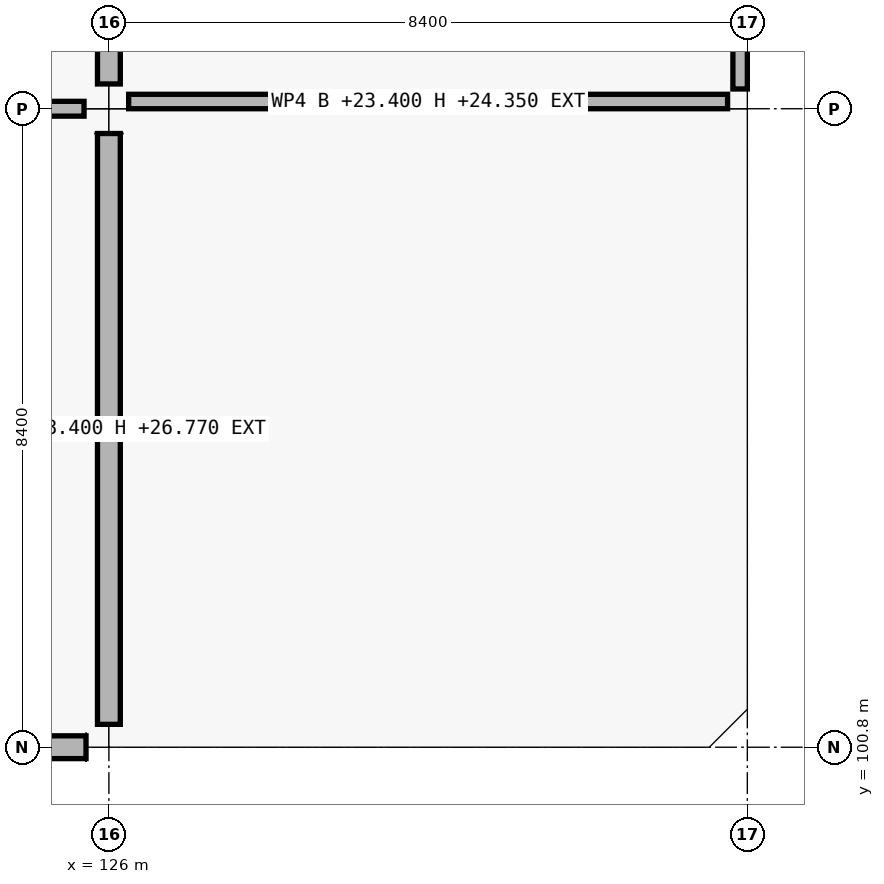
"""IFC4 building model, lengths in metres.
Left out: names, types, materials, properties, quantities, classifications, styles, units other than length and angle.
Written with IfcOpenShell. Run it as: python <this file> out.ifc"""

import sys

from ifc_helpers import new_model, si_unit, direction, frame, frame_2d, origin, origin_2d, place, context, subcontext, project, spatial, rectangle, extrude, element, fill, save


model = new_model("IFC4")
c1 = context("Model", 3, precision=1e-05, world=origin(), true_north=direction((0.0, 1.0)))
c2 = subcontext(c1, "Body", "Model", "MODEL_VIEW")
j1 = project(units=[si_unit("LENGTHUNIT", "METRE"), si_unit("PLANEANGLEUNIT", "RADIAN")], contexts=[c1])
p1 = place(None, origin())
s1 = spatial("IfcSite", under=j1, at=p1, CompositionType="ELEMENT")
p2 = place(p1, origin())
s2 = spatial("IfcBuilding", under=s1, at=p2, CompositionType="ELEMENT")
p3 = place(p2, frame((0.0, 0.0, 23.4)))
s3 = spatial("IfcBuildingStorey", under=s2, at=p3, CompositionType="ELEMENT", Elevation=23.4)
p4 = place(p3, frame((126.0, 100.8, 0.0), z_axis=(0.0, 0.0, 1.0), x_axis=(1.0, 0.0, 0.0)))
e1 = element("IfcColumn", 1, at=p4, inside=s3, PredefinedType="COLUMN", context=c2, shape_type="SweptSolid", body=[
    extrude(rectangle(XDim=0.6, YDim=0.6, at=origin_2d()), origin(), (0.0, 0.0, 1.0), 4.32),
])
p5 = place(p3, frame((126.0, 109.2, 0.0), z_axis=(0.0, 0.0, 1.0), x_axis=(1.0, 0.0, 0.0)))
e2 = element("IfcColumn", 2, at=p5, inside=s3, PredefinedType="COLUMN", context=c2, shape_type="SweptSolid", body=[
    extrude(rectangle(XDim=0.65, YDim=0.65, at=origin_2d()), origin(), (0.0, 0.0, 1.0), 4.32),
])
p6 = place(p3, frame((125.699, 100.8, 0.0), z_axis=(0.0, 0.0, 1.0), x_axis=(-1.0, 0.0, 0.0)))
e3 = element("IfcWall", 3, at=p6, inside=s3, PredefinedType="SOLIDWALL", context=c2, shape_type="SweptSolid", body=[
    extrude(rectangle(XDim=7.773, YDim=0.3, at=frame_2d((3.886, 0.0))), origin(), (0.0, 0.0, 1.0), 3.37),
])
p7 = place(p6, frame((2.986, 0.0, 0.9)))
e4 = element("IfcOpeningElement", 4, at=p7, cuts=e3, PredefinedType="OPENING", context=c2, shape_type="SweptSolid", body=[
    extrude(rectangle(XDim=1.8, YDim=1.8, at=frame_2d((0.9, 0.9))), frame((0.0, 0.15, 0.0), z_axis=(0.0, -1.0, 0.0), x_axis=(1.0, 0.0, 0.0)), (0.0, 0.0, 1.0), 0.3),
])
p8 = place(p3, frame((126.0, 108.874, 0.0), z_axis=(0.0, 0.0, 1.0), x_axis=(0.0, -1.0, 0.0)))
e5 = element("IfcWall", 5, at=p8, inside=s3, PredefinedType="SOLIDWALL", context=c2, shape_type="SweptSolid", body=[
    extrude(rectangle(XDim=7.773, YDim=0.3, at=frame_2d((3.886, 0.0))), origin(), (0.0, 0.0, 1.0), 3.37),
])
p9 = place(p8, frame((3.061, 0.0, 0.0)))
e6 = element("IfcOpeningElement", 6, at=p9, cuts=e5, PredefinedType="OPENING", context=c2, shape_type="SweptSolid", body=[
    extrude(rectangle(XDim=1.65, YDim=2.2, at=frame_2d((0.825, 1.1))), frame((0.0, 0.15, 0.0), z_axis=(0.0, -1.0, 0.0), x_axis=(1.0, 0.0, 0.0)), (0.0, 0.0, 1.0), 0.3),
])
p10 = place(p3, frame((126.0, 117.324, 0.0), z_axis=(0.0, 0.0, 1.0), x_axis=(0.0, -1.0, 0.0)))
e7 = element("IfcWall", 7, at=p10, inside=s3, PredefinedType="SOLIDWALL", context=c2, shape_type="SweptSolid", body=[
    extrude(rectangle(XDim=7.798, YDim=0.3, at=frame_2d((3.899, 0.0))), origin(), (0.0, 0.0, 1.0), 3.37),
])
p11 = place(p10, frame((2.699, 0.0, 0.9)))
e8 = element("IfcOpeningElement", 8, at=p11, cuts=e7, PredefinedType="OPENING", context=c2, shape_type="SweptSolid", body=[
    extrude(rectangle(XDim=2.4, YDim=1.8, at=frame_2d((1.2, 0.9))), frame((0.0, 0.15, 0.0), z_axis=(0.0, -1.0, 0.0), x_axis=(1.0, 0.0, 0.0)), (0.0, 0.0, 1.0), 0.3),
])
p12 = place(p3, frame((134.14, 109.295, 0.0), z_axis=(0.0, 0.0, 1.0), x_axis=(-1.0, 0.0, 0.0)))
e9 = element("IfcWall", 9, at=p12, inside=s3, PredefinedType="PARAPET", context=c2, shape_type="SweptSolid", body=[
    extrude(rectangle(XDim=7.88, YDim=0.19, at=frame_2d((3.94, 0.0))), origin(), (0.0, 0.0, 1.0), 0.95),
])
p13 = place(p3, frame((134.305, 117.34, 0.0), z_axis=(0.0, 0.0, 1.0), x_axis=(0.0, -1.0, 0.0)))
e10 = element("IfcWall", 10, at=p13, inside=s3, PredefinedType="PARAPET", context=c2, shape_type="SweptSolid", body=[
    extrude(rectangle(XDim=7.88, YDim=0.19, at=frame_2d((3.94, 0.0))), origin(), (0.0, 0.0, 1.0), 0.95),
])
p14 = place(p3, frame((117.902, 109.2, 0.0), z_axis=(0.0, 0.0, 1.0), x_axis=(1.0, 0.0, 0.0)))
e11 = element("IfcWall", 11, at=p14, inside=s3, PredefinedType="PARTITIONING", context=c2, shape_type="SweptSolid", body=[
    extrude(rectangle(XDim=7.771, YDim=0.195, at=frame_2d((3.885, 0.0))), origin(), (0.0, 0.0, 1.0), 3.19),
])
p15 = place(p14, frame((3.085, 0.0, 0.0)))
e12 = element("IfcOpeningElement", 12, at=p15, cuts=e11, PredefinedType="OPENING", context=c2, shape_type="SweptSolid", body=[
    extrude(rectangle(XDim=1.6, YDim=2.3, at=frame_2d((0.8, 1.15))), frame((0.0, 0.098, 0.0), z_axis=(0.0, -1.0, 0.0), x_axis=(1.0, 0.0, 0.0)), (0.0, 0.0, 1.0), 0.195),
])
p16 = place(p9, origin())
e13 = element("IfcDoor", 13, at=p16, inside=s3, OperationType="DOUBLE_DOOR_SINGLE_SWING", PredefinedType="DOOR", context=c2, shape_type="SweptSolid", body=[
    extrude(rectangle(XDim=1.65, YDim=2.2, at=frame_2d((0.825, 1.1))), frame((0.0, 0.025, 0.0), z_axis=(0.0, -1.0, 0.0), x_axis=(1.0, 0.0, 0.0)), (0.0, 0.0, 1.0), 0.05),
])
fill(e6, e13)
save(model, sys.argv[1])
